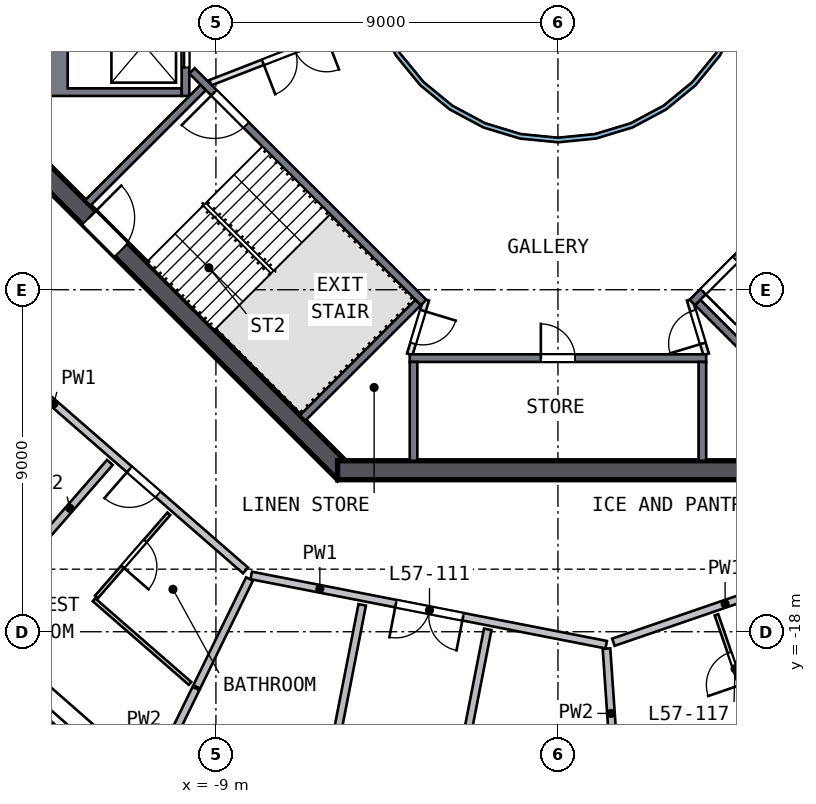
"""IFC4 building model, lengths in metres.
Left out: names, types, materials, properties, quantities, classifications, styles, units other than length and angle.
Written with IfcOpenShell. Run it as: python <this file> out.ifc"""

import sys

from ifc_helpers import new_model, si_unit, direction, frame, frame_2d, origin, place, context, subcontext, project, spatial, polyline, rectangle, outline, extrude, element, fill, save


model = new_model("IFC4")
c1 = context("Model", 3, precision=1e-05, world=origin(), true_north=direction((0.0, 1.0)))
c2 = subcontext(c1, "Body", "Model", "MODEL_VIEW")
j1 = project(units=[si_unit("LENGTHUNIT", "METRE"), si_unit("PLANEANGLEUNIT", "RADIAN")], contexts=[c1])
p1 = place(None, origin())
s1 = spatial("IfcSite", under=j1, at=p1, CompositionType="ELEMENT")
p2 = place(p1, origin())
s2 = spatial("IfcBuilding", under=s1, at=p2, CompositionType="ELEMENT")
p3 = place(p2, frame((0.0, 0.0, 234.0)))
s3 = spatial("IfcBuildingStorey", under=s2, at=p3, CompositionType="ELEMENT", Elevation=234.0)
p4 = place(p3, frame((-13.823, -5.622, 0.0), z_axis=(0.0, 0.0, 1.0), x_axis=(0.707106781, -0.707106781, 0.0)))
e1 = element("IfcWall", 1, at=p4, inside=s3, PredefinedType="SHEAR", context=c2, shape_type="SweptSolid", body=[
    extrude(rectangle(XDim=11.598, YDim=0.5, at=frame_2d((5.799, 0.0))), origin(), (0.0, 0.0, 1.0), 3.5),
])
p5 = place(p4, frame((2.099, 0.0, 0.0)))
e2 = element("IfcOpeningElement", 2, at=p5, cuts=e1, PredefinedType="OPENING", context=c2, shape_type="SweptSolid", body=[
    extrude(rectangle(XDim=1.2, YDim=2.1, at=frame_2d((0.6, 1.05))), frame((0.0, 0.26, 0.0), z_axis=(0.0, -1.0, 0.0), x_axis=(1.0, 0.0, 0.0)), (0.0, 0.0, 1.0), 0.52),
])
p6 = place(p3, frame((-5.799, -13.75, 0.0), z_axis=(0.0, 0.0, 1.0), x_axis=(1.0, 0.0, 0.0)))
e3 = element("IfcWall", 3, at=p6, inside=s3, PredefinedType="SHEAR", context=c2, shape_type="SweptSolid", body=[
    extrude(rectangle(XDim=11.598, YDim=0.5, at=frame_2d((5.799, 0.0))), origin(), (0.0, 0.0, 1.0), 3.5),
])
p7 = place(p3, origin())
e4 = element("IfcWall", 4, at=p7, inside=s3, PredefinedType="SOLIDWALL", context=c2, shape_type="SweptSolid", body=[
    extrude(outline(polyline([(-13.5, -3.9), (-13.5, -1.2), (-9.9, -1.2), (-9.9, -1.4), (-12.9, -1.4), (-12.9, -3.7), (-9.9, -3.7), (-9.9, -3.9), (-13.5, -3.9)])), origin(), (0.0, 0.0, 1.0), 3.19),
])
p8 = place(p3, frame((-9.8, -1.2, 0.0), z_axis=(0.0, 0.0, 1.0), x_axis=(0.0, -1.0, 0.0)))
e5 = element("IfcWall", 5, at=p8, inside=s3, PredefinedType="SOLIDWALL", context=c2, shape_type="SweptSolid", body=[
    extrude(rectangle(XDim=2.7, YDim=0.2, at=frame_2d((1.35, 0.0))), origin(), (0.0, 0.0, 1.0), 3.19),
])
p9 = place(p8, frame((0.75, 0.0, 0.0)))
e6 = element("IfcOpeningElement", 6, at=p9, cuts=e5, PredefinedType="OPENING", context=c2, shape_type="SweptSolid", body=[
    extrude(rectangle(XDim=1.2, YDim=2.1, at=frame_2d((0.6, 1.05))), frame((0.0, 0.11, 0.0), z_axis=(0.0, -1.0, 0.0), x_axis=(1.0, 0.0, 0.0)), (0.0, 0.0, 1.0), 0.22),
])
p10 = place(p3, frame((-3.9, -10.8, 0.0), z_axis=(0.0, 0.0, 1.0), x_axis=(1.0, 0.0, 0.0)))
e7 = element("IfcWall", 7, at=p10, inside=s3, PredefinedType="SOLIDWALL", context=c2, shape_type="SweptSolid", body=[
    extrude(rectangle(XDim=7.8, YDim=0.2, at=frame_2d((3.9, 0.0))), origin(), (0.0, 0.0, 1.0), 3.19),
])
p11 = place(p10, frame((3.45, 0.0, 0.0)))
e8 = element("IfcOpeningElement", 8, at=p11, cuts=e7, PredefinedType="OPENING", context=c2, shape_type="SweptSolid", body=[
    extrude(rectangle(XDim=0.9, YDim=2.1, at=frame_2d((0.45, 1.05))), frame((0.0, 0.11, 0.0), z_axis=(0.0, -1.0, 0.0), x_axis=(1.0, 0.0, 0.0)), (0.0, 0.0, 1.0), 0.22),
])
for number, where, z_axis, x_axis in (
    (9, (-3.8, -10.9, 0.0), (0.0, 0.0, 1.0), (0.0, -1.0, 0.0)),
    (10, (3.8, -10.9, 0.0), (0.0, 0.0, 1.0), (0.0, -1.0, 0.0)),
):
    element("IfcWall", number, at=place(p3, frame(where, z_axis=z_axis, x_axis=x_axis)), inside=s3, PredefinedType="SOLIDWALL", context=c2, shape_type="SweptSolid", body=[
        extrude(rectangle(XDim=2.6, YDim=0.2, at=frame_2d((1.3, 0.0))), origin(), (0.0, 0.0, 1.0), 3.19),
    ])
p12 = place(p3, frame((-3.535, -9.334, 0.0), z_axis=(0.0, 0.0, 1.0), x_axis=(-0.707120946, 0.707092617, 0.0)))
e11 = element("IfcWall", 11, at=p12, inside=s3, PredefinedType="SOLIDWALL", context=c2, shape_type="SweptSolid", body=[
    extrude(rectangle(XDim=8.618, YDim=0.2, at=frame_2d((4.309, 0.0))), origin(), (0.0, 0.0, 1.0), 3.19),
])
p13 = place(p12, frame((6.6, 0.0, 0.0)))
e12 = element("IfcOpeningElement", 12, at=p13, cuts=e11, PredefinedType="OPENING", context=c2, shape_type="SweptSolid", body=[
    extrude(rectangle(XDim=1.2, YDim=2.1, at=frame_2d((0.6, 1.05))), frame((0.0, 0.11, 0.0), z_axis=(0.0, -1.0, 0.0), x_axis=(1.0, 0.0, 0.0)), (0.0, 0.0, 1.0), 0.22),
])
for number, where, z_axis, x_axis in (
    (13, (-9.334, -3.677, 0.0), (0.0, 0.0, 1.0), (-0.707, -0.707, 0.0)),
    (14, (-3.677, -9.334, 0.0), (0.0, 0.0, 1.0), (-0.707, -0.707, 0.0)),
):
    element("IfcWall", number, at=place(p3, frame(where, z_axis=z_axis, x_axis=x_axis)), inside=s3, PredefinedType="SOLIDWALL", context=c2, shape_type="SweptSolid", body=[
        extrude(rectangle(XDim=4.3, YDim=0.2, at=frame_2d((2.15, 0.0))), origin(), (0.0, 0.0, 1.0), 3.19),
    ])
p14 = place(p3, frame((9.629, -3.24, 0.0), z_axis=(0.0, 0.0, 1.0), x_axis=(-0.707120946, -0.707092617, 0.0)))
e15 = element("IfcWall", 15, at=p14, inside=s3, PredefinedType="SOLIDWALL", context=c2, shape_type="SweptSolid", body=[
    extrude(rectangle(XDim=8.618, YDim=0.2, at=frame_2d((4.309, 0.0))), origin(), (0.0, 0.0, 1.0), 3.19),
])
p15 = place(p14, frame((7.018, 0.0, 0.0)))
e16 = element("IfcOpeningElement", 16, at=p15, cuts=e15, PredefinedType="OPENING", context=c2, shape_type="SweptSolid", body=[
    extrude(rectangle(XDim=1.2, YDim=2.1, at=frame_2d((0.6, 1.05))), frame((0.0, 0.11, 0.0), z_axis=(0.0, -1.0, 0.0), x_axis=(1.0, 0.0, 0.0)), (0.0, 0.0, 1.0), 0.22),
])
p16 = place(p3, frame((3.677, -9.334, 0.0), z_axis=(0.0, 0.0, 1.0), x_axis=(0.707078393, -0.707135168, 0.0)))
e17 = element("IfcWall", 17, at=p16, inside=s3, PredefinedType="SOLIDWALL", context=c2, shape_type="SweptSolid", body=[
    extrude(rectangle(XDim=4.3, YDim=0.2, at=frame_2d((2.15, 0.0))), origin(), (0.0, 0.0, 1.0), 3.19),
])
p17 = place(p3, frame((-3.465, -9.263, 0.0), z_axis=(0.0, 0.0, 1.0), x_axis=(-0.289808785, -0.957084567, 0.0)))
e18 = element("IfcWall", 18, at=p17, inside=s3, PredefinedType="PARTITIONING", context=c2, shape_type="SweptSolid", body=[
    extrude(rectangle(XDim=1.501, YDim=0.15, at=frame_2d((0.75, 0.0))), origin(), (0.0, 0.0, 1.0), 3.19),
])
p18 = place(p17, frame((0.301, 0.0, 0.0)))
e19 = element("IfcOpeningElement", 19, at=p18, cuts=e18, PredefinedType="OPENING", context=c2, shape_type="SweptSolid", body=[
    extrude(rectangle(XDim=0.9, YDim=2.1, at=frame_2d((0.45, 1.05))), frame((0.0, 0.085, 0.0), z_axis=(0.0, -1.0, 0.0), x_axis=(1.0, 0.0, 0.0)), (0.0, 0.0, 1.0), 0.17),
])
p19 = place(p3, frame((3.9, -10.7, 0.0), z_axis=(0.0, 0.0, 1.0), x_axis=(-0.289808785, 0.957084567, 0.0)))
e20 = element("IfcWall", 20, at=p19, inside=s3, PredefinedType="PARTITIONING", context=c2, shape_type="SweptSolid", body=[
    extrude(rectangle(XDim=1.501, YDim=0.15, at=frame_2d((0.75, 0.0))), origin(), (0.0, 0.0, 1.0), 3.19),
])
p20 = place(p19, frame((0.301, 0.0, 0.0)))
e21 = element("IfcOpeningElement", 21, at=p20, cuts=e20, PredefinedType="OPENING", context=c2, shape_type="SweptSolid", body=[
    extrude(rectangle(XDim=0.9, YDim=2.1, at=frame_2d((0.45, 1.05))), frame((0.0, 0.085, 0.0), z_axis=(0.0, -1.0, 0.0), x_axis=(1.0, 0.0, 0.0)), (0.0, 0.0, 1.0), 0.17),
])
p21 = place(p3, frame((-4.782, -1.857, 0.0), z_axis=(0.0, 0.0, 1.0), x_axis=(-0.932155279, -0.362058746, 0.0)))
e22 = element("IfcWall", 22, at=p21, inside=s3, PredefinedType="PARTITIONING", context=c2, shape_type="SweptSolid", body=[
    extrude(rectangle(XDim=4.682, YDim=0.15, at=frame_2d((2.341, 0.0))), origin(), (0.0, 0.0, 1.0), 3.19),
])
p22 = place(p21, frame((1.4, 0.0, 0.0)))
e23 = element("IfcOpeningElement", 23, at=p22, cuts=e22, PredefinedType="OPENING", context=c2, shape_type="SweptSolid", body=[
    extrude(rectangle(XDim=1.8, YDim=2.1, at=frame_2d((0.9, 1.05))), frame((0.0, 0.085, 0.0), z_axis=(0.0, -1.0, 0.0), x_axis=(1.0, 0.0, 0.0)), (0.0, 0.0, 1.0), 0.17),
])
p23 = place(p3, origin())
e24 = element("IfcWall", 24, at=p23, inside=s3, PredefinedType="SOLIDWALL", context=c2, shape_type="SweptSolid", body=[
    extrude(outline(polyline([(5.021, -0.999), (4.73, -1.959), (4.257, -2.844), (3.62, -3.62), (2.844, -4.257), (1.959, -4.73), (0.999, -5.021), (0.0, -5.12), (-0.999, -5.021), (-1.959, -4.73), (-2.844, -4.257), (-3.62, -3.62), (-4.257, -2.844), (-4.73, -1.959), (-5.021, -0.999), (-5.12, 0.0), (-5.021, 0.999), (-4.73, 1.959), (-4.257, 2.844), (-3.62, 3.62), (-2.844, 4.257), (-1.959, 4.73), (-0.999, 5.021), (0.0, 5.12), (0.999, 5.021), (1.959, 4.73), (2.844, 4.257), (3.62, 3.62), (4.257, 2.844), (4.73, 1.959), (5.021, 0.999), (5.12, 0.0), (5.021, -0.999)]), holes=[polyline([(4.904, 0.976), (4.619, 1.913), (4.157, 2.778), (3.535, 3.535), (2.778, 4.157), (1.913, 4.619), (0.976, 4.904), (0.0, 5.0), (-0.976, 4.904), (-1.913, 4.619), (-2.778, 4.157), (-3.535, 3.535), (-4.157, 2.778), (-4.619, 1.913), (-4.904, 0.976), (-5.0, 0.0), (-4.904, -0.976), (-4.619, -1.913), (-4.157, -2.778), (-3.535, -3.535), (-2.778, -4.157), (-1.913, -4.619), (-0.976, -4.904), (0.0, -5.0), (0.976, -4.904), (1.913, -4.619), (2.778, -4.157), (3.535, -3.535), (4.157, -2.778), (4.619, -1.913), (4.904, -0.976), (5.0, 0.0), (4.904, 0.976)])]), origin(), (0.0, 0.0, 1.0), 3.19),
])
p24 = place(p3, frame((-8.222, -16.387, 0.0), z_axis=(0.0, 0.0, 1.0), x_axis=(-0.754251424, 0.656585706, 0.0)))
e25 = element("IfcWall", 25, at=p24, inside=s3, PredefinedType="SOLIDWALL", context=c2, shape_type="SweptSolid", body=[
    extrude(rectangle(XDim=9.117, YDim=0.2, at=frame_2d((4.558, 0.0))), origin(), (0.0, 0.0, 1.0), 3.19),
])
p25 = place(p24, frame((3.05, 0.0, 0.0)))
e26 = element("IfcOpeningElement", 26, at=p25, cuts=e25, PredefinedType="OPENING", context=c2, shape_type="SweptSolid", body=[
    extrude(rectangle(XDim=1.0, YDim=2.1, at=frame_2d((0.5, 1.05))), frame((0.0, 0.11, 0.0), z_axis=(0.0, -1.0, 0.0), x_axis=(1.0, 0.0, 0.0)), (0.0, 0.0, 1.0), 0.22),
])
p26 = place(p3, frame((1.27, -18.341, 0.0), z_axis=(0.0, 0.0, 1.0), x_axis=(-0.981496237, 0.191481427, 0.0)))
e27 = element("IfcWall", 27, at=p26, inside=s3, PredefinedType="SOLIDWALL", context=c2, shape_type="SweptSolid", body=[
    extrude(rectangle(XDim=9.517, YDim=0.2, at=frame_2d((4.758, 0.0))), origin(), (0.0, 0.0, 1.0), 3.19),
])
p27 = place(p26, frame((3.838, 0.0, 0.0)))
e28 = element("IfcOpeningElement", 28, at=p27, cuts=e27, PredefinedType="OPENING", context=c2, shape_type="SweptSolid", body=[
    extrude(rectangle(XDim=1.8, YDim=2.1, at=frame_2d((0.9, 1.05))), frame((0.0, 0.11, 0.0), z_axis=(0.0, -1.0, 0.0), x_axis=(1.0, 0.0, 0.0)), (0.0, 0.0, 1.0), 0.22),
])
p28 = place(p3, frame((10.27, -15.249, 0.0), z_axis=(0.0, 0.0, 1.0), x_axis=(-0.945745241, -0.324909125, 0.0)))
e29 = element("IfcWall", 29, at=p28, inside=s3, PredefinedType="SOLIDWALL", context=c2, shape_type="SweptSolid", body=[
    extrude(rectangle(XDim=9.317, YDim=0.2, at=frame_2d((4.658, 0.0))), origin(), (0.0, 0.0, 1.0), 3.19),
])
p29 = place(p28, frame((1.9, 0.0, 0.0)))
e30 = element("IfcOpeningElement", 30, at=p29, cuts=e29, PredefinedType="OPENING", context=c2, shape_type="SweptSolid", body=[
    extrude(rectangle(XDim=1.0, YDim=2.1, at=frame_2d((0.5, 1.05))), frame((0.0, 0.11, 0.0), z_axis=(0.0, -1.0, 0.0), x_axis=(1.0, 0.0, 0.0)), (0.0, 0.0, 1.0), 0.22),
])
p30 = place(p3, frame((-11.791, -13.545, 0.0), z_axis=(0.0, 0.0, 1.0), x_axis=(-0.656590394, -0.754247343, 0.0)))
e31 = element("IfcWall", 31, at=p30, inside=s3, PredefinedType="SOLIDWALL", context=c2, shape_type="SweptSolid", body=[
    extrude(rectangle(XDim=3.2, YDim=0.2, at=frame_2d((1.6, 0.0))), origin(), (0.0, 0.0, 1.0), 3.19),
])
p31 = place(p3, frame((-10.959, -22.43, 0.0), z_axis=(0.0, 0.0, 1.0), x_axis=(0.438978354, 0.898497638, 0.0)))
e32 = element("IfcWall", 32, at=p31, inside=s3, PredefinedType="SOLIDWALL", context=c2, shape_type="SweptSolid", body=[
    extrude(rectangle(XDim=3.269, YDim=0.2, at=frame_2d((1.634, 0.0))), origin(), (0.0, 0.0, 1.0), 3.19),
])
p32 = place(p3, frame((-9.504, -19.452, 0.0), z_axis=(0.0, 0.0, 1.0), x_axis=(0.439039755, 0.898467636, 0.0)))
e33 = element("IfcWall", 33, at=p32, inside=s3, PredefinedType="SOLIDWALL", context=c2, shape_type="SweptSolid", body=[
    extrude(rectangle(XDim=3.161, YDim=0.2, at=frame_2d((1.581, 0.0))), origin(), (0.0, 0.0, 1.0), 3.19),
])
p33 = place(p3, frame((-7.124, -27.403, 0.0), z_axis=(0.0, 0.0, 1.0), x_axis=(0.191483632, 0.981495807, 0.0)))
e34 = element("IfcWall", 34, at=p33, inside=s3, PredefinedType="SOLIDWALL", context=c2, shape_type="SweptSolid", body=[
    extrude(rectangle(XDim=10.302, YDim=0.2, at=frame_2d((5.151, 0.0))), origin(), (0.0, 0.0, 1.0), 3.19),
])
p34 = place(p33, frame((2.5, 0.0, 0.0)))
e35 = element("IfcOpeningElement", 35, at=p34, cuts=e34, PredefinedType="OPENING", context=c2, shape_type="SweptSolid", body=[
    extrude(rectangle(XDim=1.0, YDim=2.1, at=frame_2d((0.5, 1.05))), frame((0.0, 0.11, 0.0), z_axis=(0.0, -1.0, 0.0), x_axis=(1.0, 0.0, 0.0)), (0.0, 0.0, 1.0), 0.22),
])
p35 = place(p3, frame((-1.848, -17.936, 0.0), z_axis=(0.0, 0.0, 1.0), x_axis=(-0.191483632, -0.981495807, 0.0)))
e36 = element("IfcWall", 36, at=p35, inside=s3, PredefinedType="SOLIDWALL", context=c2, shape_type="SweptSolid", body=[
    extrude(rectangle(XDim=10.302, YDim=0.2, at=frame_2d((5.151, 0.0))), origin(), (0.0, 0.0, 1.0), 3.19),
])
p36 = place(p35, frame((2.95, 0.0, 0.0)))
e37 = element("IfcOpeningElement", 37, at=p36, cuts=e36, PredefinedType="OPENING", context=c2, shape_type="SweptSolid", body=[
    extrude(rectangle(XDim=1.0, YDim=2.1, at=frame_2d((0.5, 1.05))), frame((0.0, 0.11, 0.0), z_axis=(0.0, -1.0, 0.0), x_axis=(1.0, 0.0, 0.0)), (0.0, 0.0, 1.0), 0.22),
])
p37 = place(p3, frame((1.277, -18.444, 0.0), z_axis=(0.0, 0.0, 1.0), x_axis=(0.069059441, -0.997612547, 0.0)))
e38 = element("IfcWall", 38, at=p37, inside=s3, PredefinedType="SOLIDWALL", context=c2, shape_type="SweptSolid", body=[
    extrude(rectangle(XDim=3.418, YDim=0.2, at=frame_2d((1.709, 0.0))), origin(), (0.0, 0.0, 1.0), 3.19),
])
p38 = place(p3, frame((-10.239, -14.896, 0.0), z_axis=(0.0, 0.0, 1.0), x_axis=(-0.65654754, -0.754284646, 0.0)))
e39 = element("IfcWall", 39, at=p38, inside=s3, PredefinedType="PARTITIONING", context=c2, shape_type="SweptSolid", body=[
    extrude(rectangle(XDim=2.9, YDim=0.1, at=frame_2d((1.45, 0.0))), origin(), (0.0, 0.0, 1.0), 3.19),
])
p39 = place(p38, frame((0.95, 0.0, 0.0)))
e40 = element("IfcOpeningElement", 40, at=p39, cuts=e39, PredefinedType="OPENING", context=c2, shape_type="SweptSolid", body=[
    extrude(rectangle(XDim=0.9, YDim=2.1, at=frame_2d((0.45, 1.05))), frame((0.0, 0.06, 0.0), z_axis=(0.0, -1.0, 0.0), x_axis=(1.0, 0.0, 0.0)), (0.0, 0.0, 1.0), 0.12),
])
p40 = place(p3, frame((-9.681, -19.359, 0.0), z_axis=(0.0, 0.0, 1.0), x_axis=(-0.754239897, 0.656598948, 0.0)))
e41 = element("IfcWall", 41, at=p40, inside=s3, PredefinedType="PARTITIONING", context=c2, shape_type="SweptSolid", body=[
    extrude(rectangle(XDim=3.351, YDim=0.1, at=frame_2d((1.675, 0.0))), origin(), (0.0, 0.0, 1.0), 3.19),
])
p41 = place(p3, frame((5.179, -20.487, 0.0), z_axis=(0.0, 0.0, 1.0), x_axis=(-0.324956504, 0.945728963, 0.0)))
e42 = element("IfcWall", 42, at=p41, inside=s3, PredefinedType="PARTITIONING", context=c2, shape_type="SweptSolid", body=[
    extrude(rectangle(XDim=3.1, YDim=0.1, at=frame_2d((1.55, 0.0))), origin(), (0.0, 0.0, 1.0), 3.19),
])
p42 = place(p41, frame((1.15, 0.0, 0.0)))
e43 = element("IfcOpeningElement", 43, at=p42, cuts=e42, PredefinedType="OPENING", context=c2, shape_type="SweptSolid", body=[
    extrude(rectangle(XDim=0.9, YDim=2.1, at=frame_2d((0.45, 1.05))), frame((0.0, 0.06, 0.0), z_axis=(0.0, -1.0, 0.0), x_axis=(1.0, 0.0, 0.0)), (0.0, 0.0, 1.0), 0.12),
])
p43 = place(p11, origin())
e44 = element("IfcDoor", 44, at=p43, inside=s3, OperationType="SINGLE_SWING_LEFT", PredefinedType="DOOR", context=c2, shape_type="SweptSolid", body=[
    extrude(rectangle(XDim=0.9, YDim=2.1, at=frame_2d((0.45, 1.05))), frame((0.0, 0.025, 0.0), z_axis=(0.0, -1.0, 0.0), x_axis=(1.0, 0.0, 0.0)), (0.0, 0.0, 1.0), 0.05),
])
fill(e8, e44)
p44 = place(p9, origin())
e45 = element("IfcDoor", 45, at=p44, inside=s3, OperationType="DOUBLE_DOOR_SLIDING", PredefinedType="DOOR", context=c2, shape_type="SweptSolid", body=[
    extrude(rectangle(XDim=1.2, YDim=2.1, at=frame_2d((0.6, 1.05))), frame((0.0, 0.025, 0.0), z_axis=(0.0, -1.0, 0.0), x_axis=(1.0, 0.0, 0.0)), (0.0, 0.0, 1.0), 0.05),
])
fill(e6, e45)
p45 = place(p13, origin())
e46 = element("IfcDoor", 46, at=p45, inside=s3, OperationType="SINGLE_SWING_RIGHT", PredefinedType="DOOR", context=c2, shape_type="SweptSolid", body=[
    extrude(rectangle(XDim=1.2, YDim=2.1, at=frame_2d((0.6, 1.05))), frame((0.0, 0.025, 0.0), z_axis=(0.0, -1.0, 0.0), x_axis=(1.0, 0.0, 0.0)), (0.0, 0.0, 1.0), 0.05),
])
fill(e12, e46)
p46 = place(p15, origin())
e47 = element("IfcDoor", 47, at=p46, inside=s3, OperationType="SINGLE_SWING_RIGHT", PredefinedType="DOOR", context=c2, shape_type="SweptSolid", body=[
    extrude(rectangle(XDim=1.2, YDim=2.1, at=frame_2d((0.6, 1.05))), frame((0.0, 0.025, 0.0), z_axis=(0.0, -1.0, 0.0), x_axis=(1.0, 0.0, 0.0)), (0.0, 0.0, 1.0), 0.05),
])
fill(e16, e47)
p47 = place(p5, origin())
e48 = element("IfcDoor", 48, at=p47, inside=s3, OperationType="SINGLE_SWING_LEFT", PredefinedType="DOOR", context=c2, shape_type="SweptSolid", body=[
    extrude(rectangle(XDim=1.2, YDim=2.1, at=frame_2d((0.6, 1.05))), frame((0.0, 0.025, 0.0), z_axis=(0.0, -1.0, 0.0), x_axis=(1.0, 0.0, 0.0)), (0.0, 0.0, 1.0), 0.05),
])
fill(e2, e48)
p48 = place(p18, origin())
e49 = element("IfcDoor", 49, at=p48, inside=s3, OperationType="SINGLE_SWING_LEFT", PredefinedType="DOOR", context=c2, shape_type="SweptSolid", body=[
    extrude(rectangle(XDim=0.9, YDim=2.1, at=frame_2d((0.45, 1.05))), frame((0.0, 0.025, 0.0), z_axis=(0.0, -1.0, 0.0), x_axis=(1.0, 0.0, 0.0)), (0.0, 0.0, 1.0), 0.05),
])
fill(e19, e49)
p49 = place(p20, origin())
e50 = element("IfcDoor", 50, at=p49, inside=s3, OperationType="SINGLE_SWING_LEFT", PredefinedType="DOOR", context=c2, shape_type="SweptSolid", body=[
    extrude(rectangle(XDim=0.9, YDim=2.1, at=frame_2d((0.45, 1.05))), frame((0.0, 0.025, 0.0), z_axis=(0.0, -1.0, 0.0), x_axis=(1.0, 0.0, 0.0)), (0.0, 0.0, 1.0), 0.05),
])
fill(e21, e50)
p50 = place(p22, origin())
e51 = element("IfcDoor", 51, at=p50, inside=s3, OperationType="DOUBLE_DOOR_SINGLE_SWING", PredefinedType="DOOR", context=c2, shape_type="SweptSolid", body=[
    extrude(rectangle(XDim=1.8, YDim=2.1, at=frame_2d((0.9, 1.05))), frame((0.0, 0.025, 0.0), z_axis=(0.0, -1.0, 0.0), x_axis=(1.0, 0.0, 0.0)), (0.0, 0.0, 1.0), 0.05),
])
fill(e23, e51)
p51 = place(p25, origin())
e52 = element("IfcDoor", 52, at=p51, inside=s3, OperationType="SINGLE_SWING_RIGHT", PredefinedType="DOOR", context=c2, shape_type="SweptSolid", body=[
    extrude(rectangle(XDim=1.0, YDim=2.1, at=frame_2d((0.5, 1.05))), frame((0.0, 0.025, 0.0), z_axis=(0.0, -1.0, 0.0), x_axis=(1.0, 0.0, 0.0)), (0.0, 0.0, 1.0), 0.05),
])
fill(e26, e52)
p52 = place(p39, origin())
e53 = element("IfcDoor", 53, at=p52, inside=s3, OperationType="SINGLE_SWING_RIGHT", PredefinedType="DOOR", context=c2, shape_type="SweptSolid", body=[
    extrude(rectangle(XDim=0.9, YDim=2.1, at=frame_2d((0.45, 1.05))), frame((0.0, 0.025, 0.0), z_axis=(0.0, -1.0, 0.0), x_axis=(1.0, 0.0, 0.0)), (0.0, 0.0, 1.0), 0.05),
])
fill(e40, e53)
p53 = place(p27, origin())
e54 = element("IfcDoor", 54, at=p53, inside=s3, OperationType="DOUBLE_DOOR_SINGLE_SWING", PredefinedType="DOOR", context=c2, shape_type="SweptSolid", body=[
    extrude(rectangle(XDim=1.8, YDim=2.1, at=frame_2d((0.9, 1.05))), frame((0.0, 0.025, 0.0), z_axis=(0.0, -1.0, 0.0), x_axis=(1.0, 0.0, 0.0)), (0.0, 0.0, 1.0), 0.05),
])
fill(e28, e54)
p54 = place(p42, origin())
e55 = element("IfcDoor", 55, at=p54, inside=s3, OperationType="SINGLE_SWING_LEFT", PredefinedType="DOOR", context=c2, shape_type="SweptSolid", body=[
    extrude(rectangle(XDim=0.9, YDim=2.1, at=frame_2d((0.45, 1.05))), frame((0.0, 0.025, 0.0), z_axis=(0.0, -1.0, 0.0), x_axis=(1.0, 0.0, 0.0)), (0.0, 0.0, 1.0), 0.05),
])
fill(e43, e55)
save(model, sys.argv[1])
